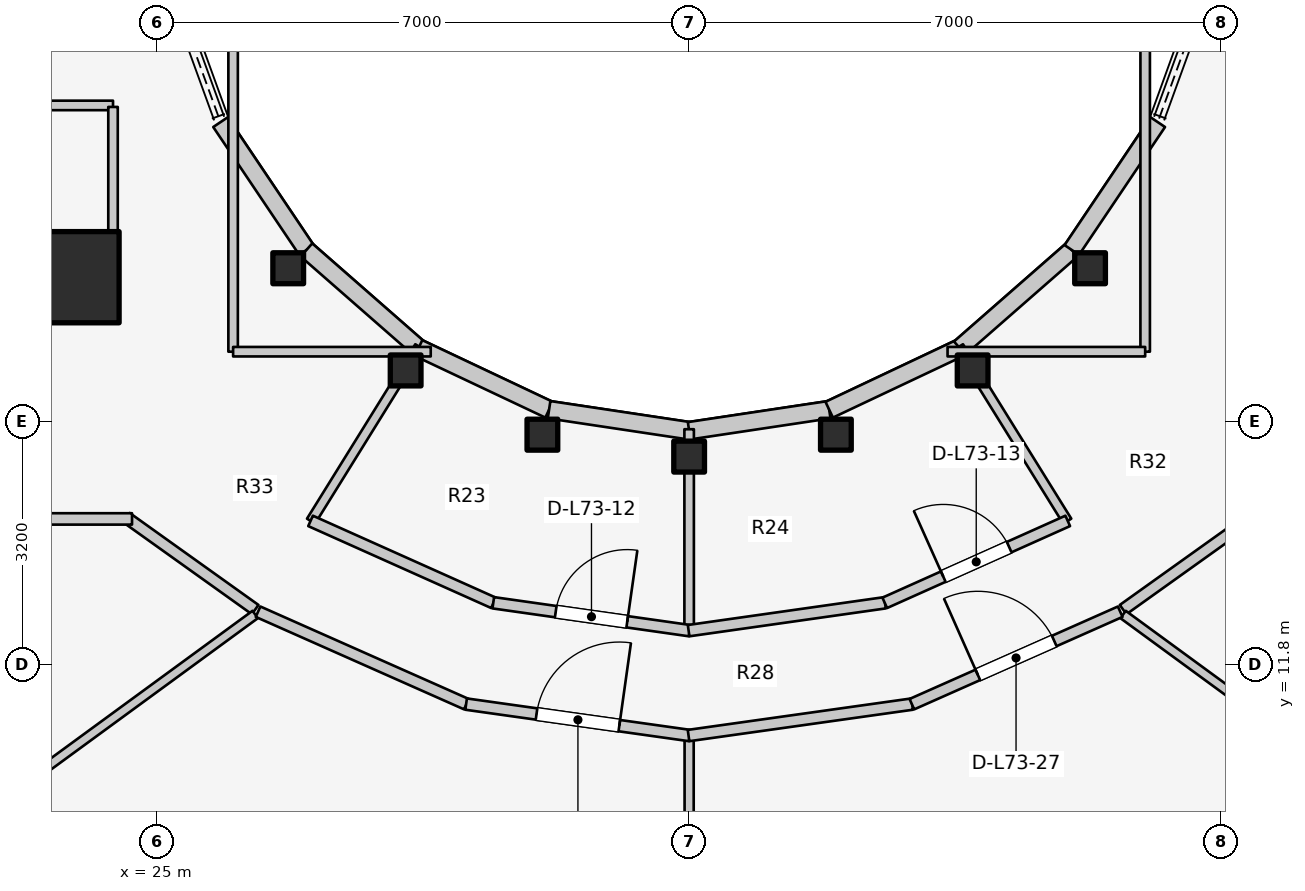
"""IFC4 building model, lengths in metres.
Left out: names, types, materials, properties, quantities, classifications, styles, units other than length and angle.
Written with IfcOpenShell. Run it as: python <this file> out.ifc"""

import sys

from ifc_helpers import new_model, si_unit, direction, frame, frame_2d, origin, origin_2d, place, context, subcontext, project, spatial, rectangle, i_section, extrude, element, fill, save


model = new_model("IFC4")
c1 = context("Model", 3, precision=1e-05, world=origin(), true_north=direction((0.0, 1.0)))
c2 = subcontext(c1, "Body", "Model", "MODEL_VIEW")
j1 = project(units=[si_unit("LENGTHUNIT", "METRE"), si_unit("PLANEANGLEUNIT", "RADIAN")], contexts=[c1])
p1 = place(None, origin())
s1 = spatial("IfcSite", under=j1, at=p1, CompositionType="ELEMENT")
p2 = place(p1, origin())
s2 = spatial("IfcBuilding", under=s1, at=p2, CompositionType="ELEMENT")
p3 = place(p2, frame((0.0, 0.0, 238.8)))
s3 = spatial("IfcBuildingStorey", under=s2, at=p3, CompositionType="ELEMENT", Elevation=238.8)
p4 = place(p3, frame((19.65, 16.55, 0.0), z_axis=(0.0, 0.0, 1.0), x_axis=(1.0, 0.0, 0.0)))
e1 = element("IfcWall", 1, at=p4, inside=s3, PredefinedType="SHEAR", context=c2, shape_type="SweptSolid", body=[
    extrude(rectangle(XDim=4.5, YDim=0.45, at=frame_2d((2.25, 0.0))), origin(), (0.0, 0.0, 1.0), 3.6),
])
p5 = place(p3, frame((23.9, 16.9, 0.0), z_axis=(0.0, 0.0, 1.0), x_axis=(1.0, 0.0, 0.0)))
e2 = element("IfcColumn", 2, at=p5, inside=s3, PredefinedType="COLUMN", context=c2, shape_type="SweptSolid", body=[
    extrude(rectangle(XDim=1.2, YDim=1.2, at=origin_2d()), origin(), (0.0, 0.0, 1.0), 3.6),
])
for number, where, z_axis, x_axis in (
    (3, (26.725, 17.018, 0.0), (0.0, 0.0, 1.0), (1.0, 0.0, 0.0)),
    (4, (28.27, 15.673, 0.0), (0.0, 0.0, 1.0), (1.0, 0.0, 0.0)),
    (5, (30.069, 14.828, 0.0), (0.0, 0.0, 1.0), (1.0, 0.0, 0.0)),
    (6, (32.0, 14.54, 0.0), (0.0, 0.0, 1.0), (1.0, 0.0, 0.0)),
    (7, (33.931, 14.828, 0.0), (0.0, 0.0, 1.0), (1.0, 0.0, 0.0)),
    (8, (35.73, 15.673, 0.0), (0.0, 0.0, 1.0), (1.0, 0.0, 0.0)),
    (9, (37.275, 17.018, 0.0), (0.0, 0.0, 1.0), (1.0, 0.0, 0.0)),
):
    element("IfcColumn", number, at=place(p3, frame(where, z_axis=z_axis, x_axis=x_axis)), inside=s3, PredefinedType="COLUMN", context=c2, shape_type="SweptSolid", body=[
        extrude(i_section(OverallWidth=0.404, OverallDepth=0.407, WebThickness=0.027, FlangeThickness=0.044, FilletRadius=0.025, at=origin_2d()), origin(), (0.0, 0.0, 1.0), 3.6),
    ])
p6 = place(p3, frame((25.834, 18.94, 0.0), z_axis=(0.0, 0.0, 1.0), x_axis=(0.558197800898, -0.829707909492, 0.0)))
e10 = element("IfcWall", 10, at=p6, inside=s3, PredefinedType="STANDARD", context=c2, shape_type="SweptSolid", body=[
    extrude(rectangle(XDim=2.027, YDim=0.23, at=frame_2d((1.013, 0.0))), origin(), (0.0, 0.0, 1.0), 2.6),
])
p7 = place(p3, frame((26.965, 17.258, 0.0), z_axis=(0.0, 0.0, 1.0), x_axis=(0.752576694707, -0.658504607869, 0.0)))
e11 = element("IfcWall", 11, at=p7, inside=s3, PredefinedType="STANDARD", context=c2, shape_type="SweptSolid", body=[
    extrude(rectangle(XDim=1.959, YDim=0.23, at=frame_2d((0.98, 0.0))), origin(), (0.0, 0.0, 1.0), 2.6),
])
p8 = place(p3, frame((28.44, 15.968, 0.0), z_axis=(0.0, 0.0, 1.0), x_axis=(0.904179699603, -0.427152280606, 0.0)))
e12 = element("IfcWall", 12, at=p8, inside=s3, PredefinedType="STANDARD", context=c2, shape_type="SweptSolid", body=[
    extrude(rectangle(XDim=1.899, YDim=0.23, at=frame_2d((0.95, 0.0))), origin(), (0.0, 0.0, 1.0), 2.6),
])
for number, where, z_axis, x_axis in (
    (13, (30.157, 15.157, 0.0), (0.0, 0.0, 1.0), (0.989, -0.149, 0.0)),
    (14, (32.0, 14.88, 0.0), (0.0, 0.0, 1.0), (0.989, 0.149, 0.0)),
):
    element("IfcWall", number, at=place(p3, frame(where, z_axis=z_axis, x_axis=x_axis)), inside=s3, PredefinedType="STANDARD", context=c2, shape_type="SweptSolid", body=[
        extrude(rectangle(XDim=1.864, YDim=0.23, at=frame_2d((0.932, 0.0))), origin(), (0.0, 0.0, 1.0), 2.6),
    ])
p9 = place(p3, frame((33.843, 15.157, 0.0), z_axis=(0.0, 0.0, 1.0), x_axis=(0.904179699603, 0.427152280606, 0.0)))
e15 = element("IfcWall", 15, at=p9, inside=s3, PredefinedType="STANDARD", context=c2, shape_type="SweptSolid", body=[
    extrude(rectangle(XDim=1.899, YDim=0.23, at=frame_2d((0.95, 0.0))), origin(), (0.0, 0.0, 1.0), 2.6),
])
p10 = place(p3, frame((35.56, 15.968, 0.0), z_axis=(0.0, 0.0, 1.0), x_axis=(0.752576694707, 0.658504607869, 0.0)))
e16 = element("IfcWall", 16, at=p10, inside=s3, PredefinedType="STANDARD", context=c2, shape_type="SweptSolid", body=[
    extrude(rectangle(XDim=1.959, YDim=0.23, at=frame_2d((0.98, 0.0))), origin(), (0.0, 0.0, 1.0), 2.6),
])
p11 = place(p3, frame((37.035, 17.258, 0.0), z_axis=(0.0, 0.0, 1.0), x_axis=(0.558197800898, 0.829707909492, 0.0)))
e17 = element("IfcWall", 17, at=p11, inside=s3, PredefinedType="STANDARD", context=c2, shape_type="SweptSolid", body=[
    extrude(rectangle(XDim=2.027, YDim=0.23, at=frame_2d((1.013, 0.0))), origin(), (0.0, 0.0, 1.0), 2.6),
])
p12 = place(p3, frame((19.55, 19.16, 0.0), z_axis=(0.0, 0.0, 1.0), x_axis=(1.0, 0.0, 0.0)))
e18 = element("IfcWall", 18, at=p12, inside=s3, PredefinedType="PARTITIONING", context=c2, shape_type="SweptSolid", body=[
    extrude(rectangle(XDim=4.87, YDim=0.125, at=frame_2d((2.435, 0.0))), origin(), (0.0, 0.0, 1.0), 2.62),
])
p13 = place(p12, frame((2.272, 0.0, 0.0)))
e19 = element("IfcOpeningElement", 19, at=p13, cuts=e18, PredefinedType="OPENING", context=c2, shape_type="SweptSolid", body=[
    extrude(rectangle(XDim=0.85, YDim=2.05, at=frame_2d((0.425, 1.025))), frame((0.0, 0.073, 0.0), z_axis=(0.0, -1.0, 0.0), x_axis=(1.0, 0.0, 0.0)), (0.0, 0.0, 1.0), 0.145),
])
p14 = place(p3, frame((24.42, 17.1, 0.0), z_axis=(0.0, 0.0, 1.0), x_axis=(0.0, 1.0, 0.0)))
e20 = element("IfcWall", 20, at=p14, inside=s3, PredefinedType="PARTITIONING", context=c2, shape_type="SweptSolid", body=[
    extrude(rectangle(XDim=2.04, YDim=0.125, at=frame_2d((1.02, 0.0))), origin(), (0.0, 0.0, 1.0), 2.672),
])
p15 = place(p3, frame((28.45, 15.985, 0.0), z_axis=(0.0, 0.0, 1.0), x_axis=(-0.527527080983, -0.849538215049, 0.0)))
e21 = element("IfcWall", 21, at=p15, inside=s3, PredefinedType="PARTITIONING", context=c2, shape_type="SweptSolid", body=[
    extrude(rectangle(XDim=2.701, YDim=0.125, at=frame_2d((1.351, 0.0))), origin(), (0.0, 0.0, 1.0), 2.672),
])
p16 = place(p3, frame((32.0, 14.9, 0.0), z_axis=(0.0, 0.0, 1.0), x_axis=(0.0, -1.0, 0.0)))
e22 = element("IfcWall", 22, at=p16, inside=s3, PredefinedType="PARTITIONING", context=c2, shape_type="SweptSolid", body=[
    extrude(rectangle(XDim=2.65, YDim=0.125, at=frame_2d((1.325, 0.0))), origin(), (0.0, 0.0, 1.0), 2.672),
])
p17 = place(p3, frame((35.55, 15.985, 0.0), z_axis=(0.0, 0.0, 1.0), x_axis=(0.527527080983, -0.849538215049, 0.0)))
e23 = element("IfcWall", 23, at=p17, inside=s3, PredefinedType="PARTITIONING", context=c2, shape_type="SweptSolid", body=[
    extrude(rectangle(XDim=2.701, YDim=0.125, at=frame_2d((1.351, 0.0))), origin(), (0.0, 0.0, 1.0), 2.672),
])
p18 = place(p3, frame((27.019, 13.694, 0.0), z_axis=(0.0, 0.0, 1.0), x_axis=(0.912628408652, -0.408790151203, 0.0)))
e24 = element("IfcWall", 24, at=p18, inside=s3, PredefinedType="PARTITIONING", context=c2, shape_type="SweptSolid", body=[
    extrude(rectangle(XDim=2.638, YDim=0.15, at=frame_2d((1.319, 0.0))), origin(), (0.0, 0.0, 1.0), 2.816),
])
p19 = place(p3, frame((29.423, 12.617, 0.0), z_axis=(0.0, 0.0, 1.0), x_axis=(0.990078185178, -0.140517569133, 0.0)))
e25 = element("IfcWall", 25, at=p19, inside=s3, PredefinedType="PARTITIONING", context=c2, shape_type="SweptSolid", body=[
    extrude(rectangle(XDim=2.61, YDim=0.15, at=frame_2d((1.305, 0.0))), origin(), (0.0, 0.0, 1.0), 2.816),
])
p20 = place(p19, frame((0.83, 0.0, 0.0)))
e26 = element("IfcOpeningElement", 26, at=p20, cuts=e25, PredefinedType="OPENING", context=c2, shape_type="SweptSolid", body=[
    extrude(rectangle(XDim=0.95, YDim=2.1, at=frame_2d((0.475, 1.05))), frame((0.0, 0.085, 0.0), z_axis=(0.0, -1.0, 0.0), x_axis=(1.0, 0.0, 0.0)), (0.0, 0.0, 1.0), 0.17),
])
p21 = place(p3, frame((31.993, 12.25, 0.0), z_axis=(0.0, 0.0, 1.0), x_axis=(0.990078185178, 0.140517569133, 0.0)))
e27 = element("IfcWall", 27, at=p21, inside=s3, PredefinedType="PARTITIONING", context=c2, shape_type="SweptSolid", body=[
    extrude(rectangle(XDim=2.61, YDim=0.15, at=frame_2d((1.305, 0.0))), origin(), (0.0, 0.0, 1.0), 2.816),
])
p22 = place(p3, frame((34.573, 12.616, 0.0), z_axis=(0.0, 0.0, 1.0), x_axis=(0.912628408652, 0.408790151203, 0.0)))
e28 = element("IfcWall", 28, at=p22, inside=s3, PredefinedType="PARTITIONING", context=c2, shape_type="SweptSolid", body=[
    extrude(rectangle(XDim=2.638, YDim=0.15, at=frame_2d((1.319, 0.0))), origin(), (0.0, 0.0, 1.0), 2.816),
])
p23 = place(p22, frame((0.844, 0.0, 0.0)))
e29 = element("IfcOpeningElement", 29, at=p23, cuts=e28, PredefinedType="OPENING", context=c2, shape_type="SweptSolid", body=[
    extrude(rectangle(XDim=0.95, YDim=2.1, at=frame_2d((0.475, 1.05))), frame((0.0, 0.085, 0.0), z_axis=(0.0, -1.0, 0.0), x_axis=(1.0, 0.0, 0.0)), (0.0, 0.0, 1.0), 0.17),
])
p24 = place(p3, frame((26.0, 15.92, 0.0), z_axis=(0.0, 0.0, 1.0), x_axis=(0.0, 1.0, 0.0)))
e30 = element("IfcWall", 30, at=p24, inside=s3, PredefinedType="PARTITIONING", context=c2, shape_type="SweptSolid", body=[
    extrude(rectangle(XDim=4.28, YDim=0.125, at=frame_2d((2.14, 0.0))), origin(), (0.0, 0.0, 1.0), 2.672),
])
p25 = place(p3, frame((26.0, 15.92, 0.0), z_axis=(0.0, 0.0, 1.0), x_axis=(1.0, 0.0, 0.0)))
e31 = element("IfcWall", 31, at=p25, inside=s3, PredefinedType="PARTITIONING", context=c2, shape_type="SweptSolid", body=[
    extrude(rectangle(XDim=2.6, YDim=0.125, at=frame_2d((1.3, 0.0))), origin(), (0.0, 0.0, 1.0), 2.672),
])
p26 = place(p3, frame((38.0, 15.92, 0.0), z_axis=(0.0, 0.0, 1.0), x_axis=(0.0, 1.0, 0.0)))
e32 = element("IfcWall", 32, at=p26, inside=s3, PredefinedType="PARTITIONING", context=c2, shape_type="SweptSolid", body=[
    extrude(rectangle(XDim=4.28, YDim=0.125, at=frame_2d((2.14, 0.0))), origin(), (0.0, 0.0, 1.0), 2.672),
])
p27 = place(p3, frame((35.4, 15.92, 0.0), z_axis=(0.0, 0.0, 1.0), x_axis=(1.0, 0.0, 0.0)))
e33 = element("IfcWall", 33, at=p27, inside=s3, PredefinedType="PARTITIONING", context=c2, shape_type="SweptSolid", body=[
    extrude(rectangle(XDim=2.6, YDim=0.125, at=frame_2d((1.3, 0.0))), origin(), (0.0, 0.0, 1.0), 2.672),
])
p28 = place(p3, frame((26.29, 12.527, 0.0), z_axis=(0.0, 0.0, 1.0), x_axis=(-0.813780999276, 0.581171648669, 0.0)))
e34 = element("IfcWall", 34, at=p28, inside=s3, PredefinedType="PARTITIONING", context=c2, shape_type="SweptSolid", body=[
    extrude(rectangle(XDim=2.082, YDim=0.15, at=frame_2d((1.041, 0.0))), origin(), (0.0, 0.0, 1.0), 2.816),
])
p29 = place(p3, frame((17.15, 13.72, 0.0), z_axis=(0.0, 0.0, 1.0), x_axis=(1.0, 0.0, 0.0)))
e35 = element("IfcWall", 35, at=p29, inside=s3, PredefinedType="PARTITIONING", context=c2, shape_type="SweptSolid", body=[
    extrude(rectangle(XDim=7.52, YDim=0.15, at=frame_2d((3.76, 0.0))), origin(), (0.0, 0.0, 1.0), 2.816),
])
p30 = place(p29, frame((1.3, 0.0, 0.0)))
e36 = element("IfcOpeningElement", 36, at=p30, cuts=e35, PredefinedType="OPENING", context=c2, shape_type="SweptSolid", body=[
    extrude(rectangle(XDim=0.9, YDim=2.1, at=frame_2d((0.45, 1.05))), frame((0.0, 0.085, 0.0), z_axis=(0.0, -1.0, 0.0), x_axis=(1.0, 0.0, 0.0)), (0.0, 0.0, 1.0), 0.17),
])
p31 = place(p3, frame((37.71, 12.527, 0.0), z_axis=(0.0, 0.0, 1.0), x_axis=(0.813780999276, 0.581171648669, 0.0)))
e37 = element("IfcWall", 37, at=p31, inside=s3, PredefinedType="PARTITIONING", context=c2, shape_type="SweptSolid", body=[
    extrude(rectangle(XDim=2.082, YDim=0.15, at=frame_2d((1.041, 0.0))), origin(), (0.0, 0.0, 1.0), 2.816),
])
p32 = place(p3, frame((26.291, 12.463, 0.0), z_axis=(0.0, 0.0, 1.0), x_axis=(-0.807095694912, -0.590420646027, 0.0)))
e38 = element("IfcWall", 38, at=p32, inside=s3, PredefinedType="MOVABLE", context=c2, shape_type="SweptSolid", body=[
    extrude(rectangle(XDim=7.119, YDim=0.12, at=frame_2d((3.56, 0.0))), origin(), (0.0, 0.0, 1.0), 2.66),
])
p33 = place(p3, frame((32.0, 10.815, 0.0), z_axis=(0.0, 0.0, 1.0), x_axis=(0.0, -1.0, 0.0)))
e39 = element("IfcWall", 39, at=p33, inside=s3, PredefinedType="MOVABLE", context=c2, shape_type="SweptSolid", body=[
    extrude(rectangle(XDim=5.895, YDim=0.12, at=frame_2d((2.948, 0.0))), origin(), (0.0, 0.0, 1.0), 2.66),
])
p34 = place(p3, frame((37.709, 12.463, 0.0), z_axis=(0.0, 0.0, 1.0), x_axis=(0.807095694912, -0.590420646027, 0.0)))
e40 = element("IfcWall", 40, at=p34, inside=s3, PredefinedType="MOVABLE", context=c2, shape_type="SweptSolid", body=[
    extrude(rectangle(XDim=7.119, YDim=0.12, at=frame_2d((3.56, 0.0))), origin(), (0.0, 0.0, 1.0), 2.66),
])
p35 = place(p3, frame((26.328, 12.499, 0.0), z_axis=(0.0, 0.0, 1.0), x_axis=(0.914043013008, -0.4056172708, 0.0)))
e41 = element("IfcWall", 41, at=p35, inside=s3, PredefinedType="PARTITIONING", context=c2, shape_type="SweptSolid", body=[
    extrude(rectangle(XDim=2.999, YDim=0.15, at=frame_2d((1.5, 0.0))), origin(), (0.0, 0.0, 1.0), 2.816),
])
p36 = place(p3, frame((29.066, 11.284, 0.0), z_axis=(0.0, 0.0, 1.0), x_axis=(0.990252860391, -0.139281271128, 0.0)))
e42 = element("IfcWall", 42, at=p36, inside=s3, PredefinedType="PARTITIONING", context=c2, shape_type="SweptSolid", body=[
    extrude(rectangle(XDim=2.971, YDim=0.15, at=frame_2d((1.486, 0.0))), origin(), (0.0, 0.0, 1.0), 2.816),
])
p37 = place(p36, frame((0.936, 0.0, 0.0)))
e43 = element("IfcOpeningElement", 43, at=p37, cuts=e42, PredefinedType="OPENING", context=c2, shape_type="SweptSolid", body=[
    extrude(rectangle(XDim=1.1, YDim=2.1, at=frame_2d((0.55, 1.05))), frame((0.0, 0.085, 0.0), z_axis=(0.0, -1.0, 0.0), x_axis=(1.0, 0.0, 0.0)), (0.0, 0.0, 1.0), 0.17),
])
p38 = place(p3, frame((31.992, 10.87, 0.0), z_axis=(0.0, 0.0, 1.0), x_axis=(0.990252860391, 0.139281271128, 0.0)))
e44 = element("IfcWall", 44, at=p38, inside=s3, PredefinedType="PARTITIONING", context=c2, shape_type="SweptSolid", body=[
    extrude(rectangle(XDim=2.971, YDim=0.15, at=frame_2d((1.486, 0.0))), origin(), (0.0, 0.0, 1.0), 2.816),
])
p39 = place(p3, frame((34.93, 11.283, 0.0), z_axis=(0.0, 0.0, 1.0), x_axis=(0.914043013008, 0.4056172708, 0.0)))
e45 = element("IfcWall", 45, at=p39, inside=s3, PredefinedType="PARTITIONING", context=c2, shape_type="SweptSolid", body=[
    extrude(rectangle(XDim=2.999, YDim=0.15, at=frame_2d((1.5, 0.0))), origin(), (0.0, 0.0, 1.0), 2.816),
])
p40 = place(p39, frame((0.949, 0.0, 0.0)))
e46 = element("IfcOpeningElement", 46, at=p40, cuts=e45, PredefinedType="OPENING", context=c2, shape_type="SweptSolid", body=[
    extrude(rectangle(XDim=1.1, YDim=2.1, at=frame_2d((0.55, 1.05))), frame((0.0, 0.085, 0.0), z_axis=(0.0, -1.0, 0.0), x_axis=(1.0, 0.0, 0.0)), (0.0, 0.0, 1.0), 0.17),
])
p41 = place(p20, origin())
e47 = element("IfcDoor", 47, at=p41, inside=s3, OperationType="SINGLE_SWING_RIGHT", PredefinedType="DOOR", context=c2, shape_type="SweptSolid", body=[
    extrude(rectangle(XDim=0.95, YDim=2.1, at=frame_2d((0.475, 1.05))), frame((0.0, 0.025, 0.0), z_axis=(0.0, -1.0, 0.0), x_axis=(1.0, 0.0, 0.0)), (0.0, 0.0, 1.0), 0.05),
])
fill(e26, e47)
p42 = place(p23, origin())
e48 = element("IfcDoor", 48, at=p42, inside=s3, OperationType="SINGLE_SWING_LEFT", PredefinedType="DOOR", context=c2, shape_type="SweptSolid", body=[
    extrude(rectangle(XDim=0.95, YDim=2.1, at=frame_2d((0.475, 1.05))), frame((0.0, 0.025, 0.0), z_axis=(0.0, -1.0, 0.0), x_axis=(1.0, 0.0, 0.0)), (0.0, 0.0, 1.0), 0.05),
])
fill(e29, e48)
p43 = place(p37, origin())
e49 = element("IfcDoor", 49, at=p43, inside=s3, OperationType="SINGLE_SWING_RIGHT", PredefinedType="DOOR", context=c2, shape_type="SweptSolid", body=[
    extrude(rectangle(XDim=1.1, YDim=2.1, at=frame_2d((0.55, 1.05))), frame((0.0, 0.025, 0.0), z_axis=(0.0, -1.0, 0.0), x_axis=(1.0, 0.0, 0.0)), (0.0, 0.0, 1.0), 0.05),
])
fill(e43, e49)
p44 = place(p40, origin())
e50 = element("IfcDoor", 50, at=p44, inside=s3, OperationType="SINGLE_SWING_LEFT", PredefinedType="DOOR", context=c2, shape_type="SweptSolid", body=[
    extrude(rectangle(XDim=1.1, YDim=2.1, at=frame_2d((0.55, 1.05))), frame((0.0, 0.025, 0.0), z_axis=(0.0, -1.0, 0.0), x_axis=(1.0, 0.0, 0.0)), (0.0, 0.0, 1.0), 0.05),
])
fill(e46, e50)
save(model, sys.argv[1])
